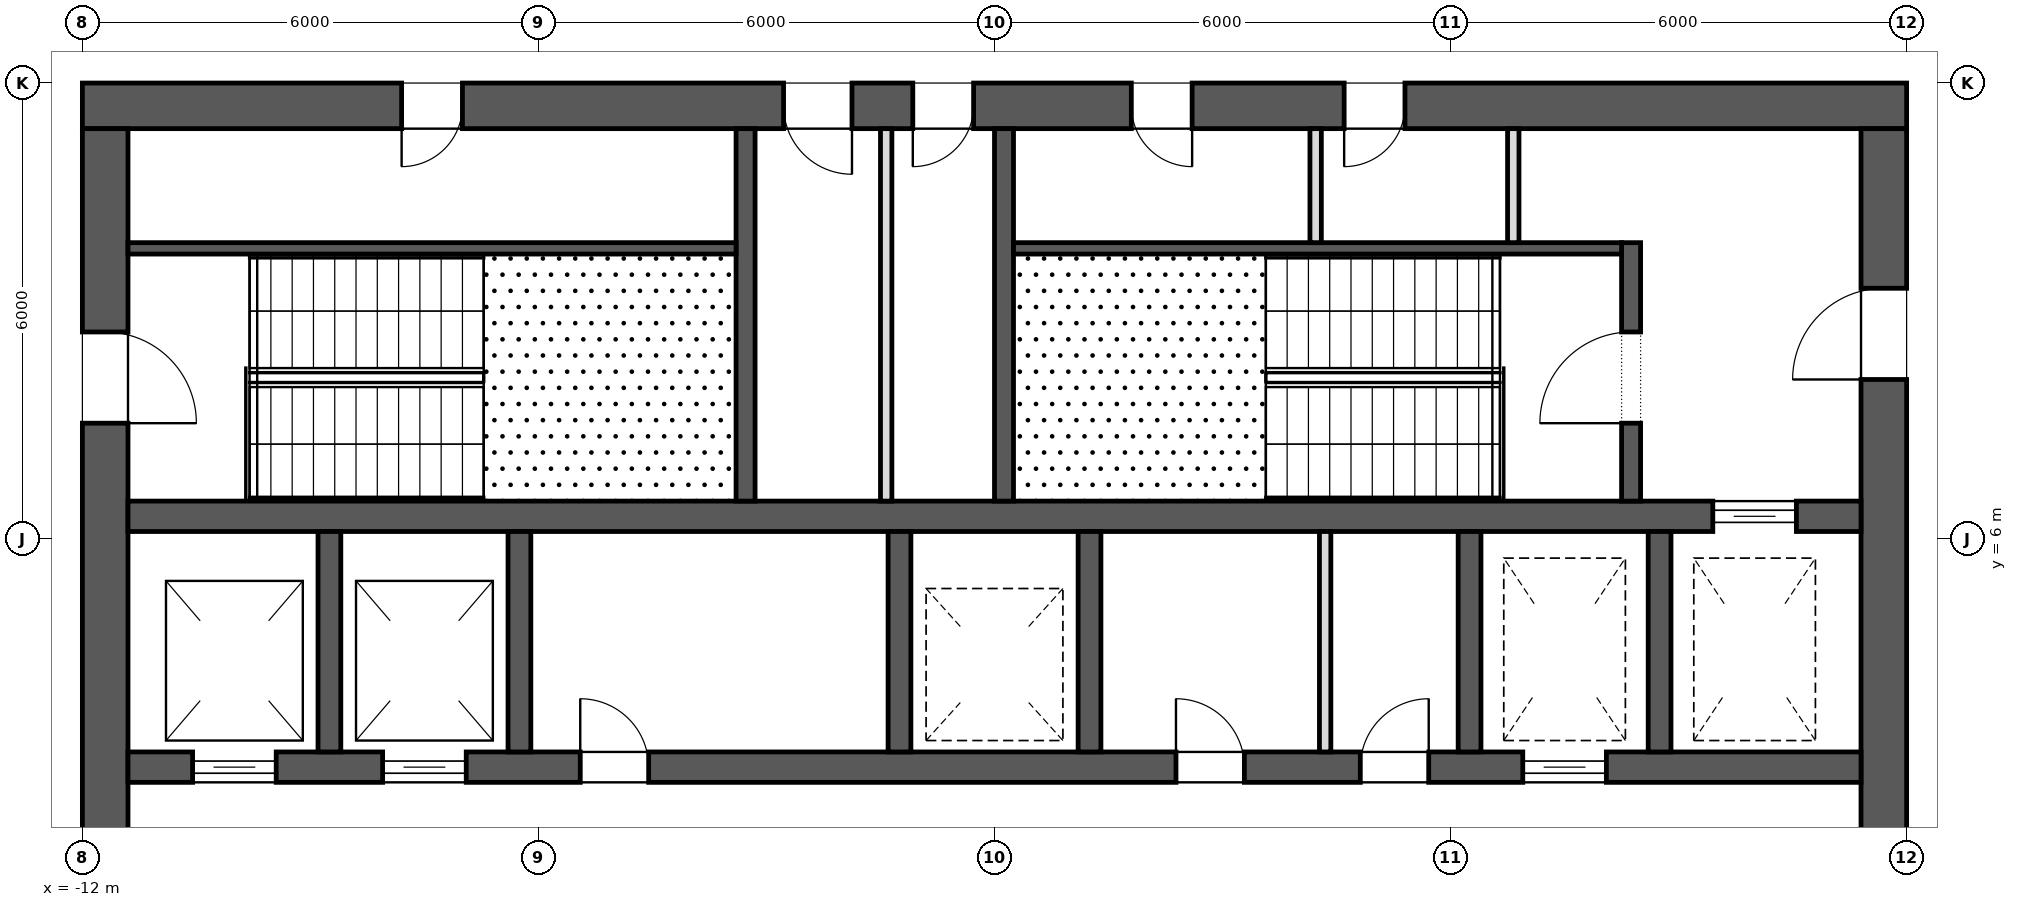
"""IFC4 building model, lengths in metres.
Left out: names, types, materials, properties, quantities, classifications, styles, units other than length and angle.
Written with IfcOpenShell. Run it as: python <this file> out.ifc"""

import sys

from ifc_helpers import new_model, si_unit, direction, frame, frame_2d, origin, place, context, subcontext, project, spatial, rectangle, extrude, element, fill, save


model = new_model("IFC4")
c1 = context("Model", 3, precision=1e-05, world=origin(), true_north=direction((0.0, 1.0)))
c2 = subcontext(c1, "Body", "Model", "MODEL_VIEW")
j1 = project(units=[si_unit("LENGTHUNIT", "METRE"), si_unit("PLANEANGLEUNIT", "RADIAN")], contexts=[c1])
p1 = place(None, origin())
s1 = spatial("IfcSite", under=j1, at=p1, CompositionType="ELEMENT")
p2 = place(p1, origin())
s2 = spatial("IfcBuilding", under=s1, at=p2, CompositionType="ELEMENT")
p3 = place(p2, frame((0.0, 0.0, 280.3)))
s3 = spatial("IfcBuildingStorey", under=s2, at=p3, CompositionType="ELEMENT", Elevation=280.3)
p4 = place(p3, frame((-12.0, 11.7, 0.0), z_axis=(0.0, 0.0, 1.0), x_axis=(1.0, 0.0, 0.0)))
e1 = element("IfcWall", 1, at=p4, inside=s3, PredefinedType="SHEAR", context=c2, shape_type="SweptSolid", body=[
    extrude(rectangle(XDim=24.0, YDim=0.6, at=frame_2d((12.0, 0.0))), origin(), (0.0, 0.0, 1.0), 4.0),
])
p5 = place(p4, frame((9.225, 0.0, 0.0)))
e2 = element("IfcOpeningElement", 2, at=p5, cuts=e1, PredefinedType="OPENING", context=c2, shape_type="SweptSolid", body=[
    extrude(rectangle(XDim=0.9, YDim=2.1, at=frame_2d((0.45, 1.05))), frame((0.0, 0.312, 0.0), z_axis=(0.0, -1.0, 0.0), x_axis=(1.0, 0.0, 0.0)), (0.0, 0.0, 1.0), 0.624),
])
p6 = place(p4, frame((10.925, 0.0, 0.0)))
e3 = element("IfcOpeningElement", 3, at=p6, cuts=e1, PredefinedType="OPENING", context=c2, shape_type="SweptSolid", body=[
    extrude(rectangle(XDim=0.8, YDim=2.1, at=frame_2d((0.4, 1.05))), frame((0.0, 0.312, 0.0), z_axis=(0.0, -1.0, 0.0), x_axis=(1.0, 0.0, 0.0)), (0.0, 0.0, 1.0), 0.624),
])
p7 = place(p4, frame((4.2, 0.0, 0.0)))
e4 = element("IfcOpeningElement", 4, at=p7, cuts=e1, PredefinedType="OPENING", context=c2, shape_type="SweptSolid", body=[
    extrude(rectangle(XDim=0.8, YDim=2.1, at=frame_2d((0.4, 1.05))), frame((0.0, 0.312, 0.0), z_axis=(0.0, -1.0, 0.0), x_axis=(1.0, 0.0, 0.0)), (0.0, 0.0, 1.0), 0.624),
])
p8 = place(p4, frame((13.8, 0.0, 0.0)))
e5 = element("IfcOpeningElement", 5, at=p8, cuts=e1, PredefinedType="OPENING", context=c2, shape_type="SweptSolid", body=[
    extrude(rectangle(XDim=0.8, YDim=2.1, at=frame_2d((0.4, 1.05))), frame((0.0, 0.312, 0.0), z_axis=(0.0, -1.0, 0.0), x_axis=(1.0, 0.0, 0.0)), (0.0, 0.0, 1.0), 0.624),
])
p9 = place(p4, frame((16.6, 0.0, 0.0)))
e6 = element("IfcOpeningElement", 6, at=p9, cuts=e1, PredefinedType="OPENING", context=c2, shape_type="SweptSolid", body=[
    extrude(rectangle(XDim=0.8, YDim=2.1, at=frame_2d((0.4, 1.05))), frame((0.0, 0.312, 0.0), z_axis=(0.0, -1.0, 0.0), x_axis=(1.0, 0.0, 0.0)), (0.0, 0.0, 1.0), 0.624),
])
p10 = place(p3, frame((11.7, -11.4, 0.0), z_axis=(0.0, 0.0, 1.0), x_axis=(0.0, 1.0, 0.0)))
e7 = element("IfcWall", 7, at=p10, inside=s3, PredefinedType="SHEAR", context=c2, shape_type="SweptSolid", body=[
    extrude(rectangle(XDim=22.8, YDim=0.6, at=frame_2d((11.4, 0.0))), origin(), (0.0, 0.0, 1.0), 4.0),
])
p11 = place(p10, frame((10.2, 0.0, 0.0)))
e8 = element("IfcOpeningElement", 8, at=p11, cuts=e7, PredefinedType="OPENING", context=c2, shape_type="SweptSolid", body=[
    extrude(rectangle(XDim=2.4, YDim=2.1, at=frame_2d((1.2, 1.05))), frame((0.0, 0.312, 0.0), z_axis=(0.0, -1.0, 0.0), x_axis=(1.0, 0.0, 0.0)), (0.0, 0.0, 1.0), 0.624),
])
p12 = place(p10, frame((19.5, 0.0, 0.0)))
e9 = element("IfcOpeningElement", 9, at=p12, cuts=e7, PredefinedType="OPENING", context=c2, shape_type="SweptSolid", body=[
    extrude(rectangle(XDim=1.2, YDim=2.1, at=frame_2d((0.6, 1.05))), frame((0.0, 0.312, 0.0), z_axis=(0.0, -1.0, 0.0), x_axis=(1.0, 0.0, 0.0)), (0.0, 0.0, 1.0), 0.624),
])
p13 = place(p10, frame((2.1, 0.0, 0.0)))
e10 = element("IfcOpeningElement", 10, at=p13, cuts=e7, PredefinedType="OPENING", context=c2, shape_type="SweptSolid", body=[
    extrude(rectangle(XDim=1.2, YDim=2.1, at=frame_2d((0.6, 1.05))), frame((0.0, 0.312, 0.0), z_axis=(0.0, -1.0, 0.0), x_axis=(1.0, 0.0, 0.0)), (0.0, 0.0, 1.0), 0.624),
])
p14 = place(p3, frame((-11.7, -11.4, 0.0), z_axis=(0.0, 0.0, 1.0), x_axis=(0.0, 1.0, 0.0)))
e11 = element("IfcWall", 11, at=p14, inside=s3, PredefinedType="SHEAR", context=c2, shape_type="SweptSolid", body=[
    extrude(rectangle(XDim=22.8, YDim=0.6, at=frame_2d((11.4, 0.0))), origin(), (0.0, 0.0, 1.0), 4.0),
])
p15 = place(p14, frame((10.2, 0.0, 0.0)))
e12 = element("IfcOpeningElement", 12, at=p15, cuts=e11, PredefinedType="OPENING", context=c2, shape_type="SweptSolid", body=[
    extrude(rectangle(XDim=2.4, YDim=2.1, at=frame_2d((1.2, 1.05))), frame((0.0, 0.312, 0.0), z_axis=(0.0, -1.0, 0.0), x_axis=(1.0, 0.0, 0.0)), (0.0, 0.0, 1.0), 0.624),
])
p16 = place(p14, frame((18.925, 0.0, 0.0)))
e13 = element("IfcOpeningElement", 13, at=p16, cuts=e11, PredefinedType="OPENING", context=c2, shape_type="SweptSolid", body=[
    extrude(rectangle(XDim=1.2, YDim=2.1, at=frame_2d((0.6, 1.05))), frame((0.0, 0.312, 0.0), z_axis=(0.0, -1.0, 0.0), x_axis=(1.0, 0.0, 0.0)), (0.0, 0.0, 1.0), 0.624),
])
p17 = place(p14, frame((2.675, 0.0, 0.0)))
e14 = element("IfcOpeningElement", 14, at=p17, cuts=e11, PredefinedType="OPENING", context=c2, shape_type="SweptSolid", body=[
    extrude(rectangle(XDim=1.2, YDim=2.1, at=frame_2d((0.6, 1.05))), frame((0.0, 0.312, 0.0), z_axis=(0.0, -1.0, 0.0), x_axis=(1.0, 0.0, 0.0)), (0.0, 0.0, 1.0), 0.624),
])
p18 = place(p3, frame((-11.4, 3.0, 0.0), z_axis=(0.0, 0.0, 1.0), x_axis=(1.0, 0.0, 0.0)))
e15 = element("IfcWall", 15, at=p18, inside=s3, PredefinedType="SHEAR", context=c2, shape_type="SweptSolid", body=[
    extrude(rectangle(XDim=22.8, YDim=0.4, at=frame_2d((11.4, 0.0))), origin(), (0.0, 0.0, 1.0), 4.0),
])
p19 = place(p18, frame((0.85, 0.0, 0.0)))
e16 = element("IfcOpeningElement", 16, at=p19, cuts=e15, PredefinedType="OPENING", context=c2, shape_type="SweptSolid", body=[
    extrude(rectangle(XDim=1.1, YDim=2.1, at=frame_2d((0.55, 1.05))), frame((0.0, 0.212, 0.0), z_axis=(0.0, -1.0, 0.0), x_axis=(1.0, 0.0, 0.0)), (0.0, 0.0, 1.0), 0.424),
])
p20 = place(p18, frame((3.35, 0.0, 0.0)))
e17 = element("IfcOpeningElement", 17, at=p20, cuts=e15, PredefinedType="OPENING", context=c2, shape_type="SweptSolid", body=[
    extrude(rectangle(XDim=1.1, YDim=2.1, at=frame_2d((0.55, 1.05))), frame((0.0, 0.212, 0.0), z_axis=(0.0, -1.0, 0.0), x_axis=(1.0, 0.0, 0.0)), (0.0, 0.0, 1.0), 0.424),
])
p21 = place(p18, frame((18.35, 0.0, 0.0)))
e18 = element("IfcOpeningElement", 18, at=p21, cuts=e15, PredefinedType="OPENING", context=c2, shape_type="SweptSolid", body=[
    extrude(rectangle(XDim=1.1, YDim=2.1, at=frame_2d((0.55, 1.05))), frame((0.0, 0.212, 0.0), z_axis=(0.0, -1.0, 0.0), x_axis=(1.0, 0.0, 0.0)), (0.0, 0.0, 1.0), 0.424),
])
p22 = place(p18, frame((13.788, 0.0, 0.0)))
e19 = element("IfcOpeningElement", 19, at=p22, cuts=e15, PredefinedType="OPENING", context=c2, shape_type="SweptSolid", body=[
    extrude(rectangle(XDim=0.9, YDim=2.1, at=frame_2d((0.45, 1.05))), frame((0.0, 0.212, 0.0), z_axis=(0.0, -1.0, 0.0), x_axis=(1.0, 0.0, 0.0)), (0.0, 0.0, 1.0), 0.424),
])
p23 = place(p18, frame((16.212, 0.0, 0.0)))
e20 = element("IfcOpeningElement", 20, at=p23, cuts=e15, PredefinedType="OPENING", context=c2, shape_type="SweptSolid", body=[
    extrude(rectangle(XDim=0.9, YDim=2.1, at=frame_2d((0.45, 1.05))), frame((0.0, 0.212, 0.0), z_axis=(0.0, -1.0, 0.0), x_axis=(1.0, 0.0, 0.0)), (0.0, 0.0, 1.0), 0.424),
])
p24 = place(p18, frame((5.95, 0.0, 0.0)))
e21 = element("IfcOpeningElement", 21, at=p24, cuts=e15, PredefinedType="OPENING", context=c2, shape_type="SweptSolid", body=[
    extrude(rectangle(XDim=0.9, YDim=2.1, at=frame_2d((0.45, 1.05))), frame((0.0, 0.212, 0.0), z_axis=(0.0, -1.0, 0.0), x_axis=(1.0, 0.0, 0.0)), (0.0, 0.0, 1.0), 0.424),
])
p25 = place(p3, frame((-11.4, 6.3, 0.0), z_axis=(0.0, 0.0, 1.0), x_axis=(1.0, 0.0, 0.0)))
e22 = element("IfcWall", 22, at=p25, inside=s3, PredefinedType="SHEAR", context=c2, shape_type="SweptSolid", body=[
    extrude(rectangle(XDim=22.8, YDim=0.4, at=frame_2d((11.4, 0.0))), origin(), (0.0, 0.0, 1.0), 4.0),
])
p26 = place(p25, frame((20.85, 0.0, 0.0)))
e23 = element("IfcOpeningElement", 23, at=p26, cuts=e22, PredefinedType="OPENING", context=c2, shape_type="SweptSolid", body=[
    extrude(rectangle(XDim=1.1, YDim=2.1, at=frame_2d((0.55, 1.05))), frame((0.0, 0.212, 0.0), z_axis=(0.0, -1.0, 0.0), x_axis=(1.0, 0.0, 0.0)), (0.0, 0.0, 1.0), 0.424),
])
for number, where, z_axis, x_axis in (
    (24, (-8.75, 3.2, 0.0), (0.0, 0.0, 1.0), (0.0, 1.0, 0.0)),
    (25, (-6.25, 3.2, 0.0), (0.0, 0.0, 1.0), (0.0, 1.0, 0.0)),
    (26, (-1.25, 3.2, 0.0), (0.0, 0.0, 1.0), (0.0, 1.0, 0.0)),
    (27, (1.25, 3.2, 0.0), (0.0, 0.0, 1.0), (0.0, 1.0, 0.0)),
    (28, (6.25, 3.2, 0.0), (0.0, 0.0, 1.0), (0.0, 1.0, 0.0)),
    (29, (8.75, 3.2, 0.0), (0.0, 0.0, 1.0), (0.0, 1.0, 0.0)),
):
    element("IfcWall", number, at=place(p3, frame(where, z_axis=z_axis, x_axis=x_axis)), inside=s3, PredefinedType="SHEAR", context=c2, shape_type="SweptSolid", body=[
        extrude(rectangle(XDim=2.9, YDim=0.3, at=frame_2d((1.45, 0.0))), origin(), (0.0, 0.0, 1.0), 4.0),
    ])
for number, where, z_axis, x_axis in (
    (30, (-3.275, 6.5, 0.0), (0.0, 0.0, 1.0), (0.0, 1.0, 0.0)),
    (31, (0.125, 6.5, 0.0), (0.0, 0.0, 1.0), (0.0, 1.0, 0.0)),
):
    element("IfcWall", number, at=place(p3, frame(where, z_axis=z_axis, x_axis=x_axis)), inside=s3, PredefinedType="SHEAR", context=c2, shape_type="SweptSolid", body=[
        extrude(rectangle(XDim=4.9, YDim=0.25, at=frame_2d((2.45, 0.0))), origin(), (0.0, 0.0, 1.0), 3.7),
    ])
p27 = place(p3, frame((8.375, 6.5, 0.0), z_axis=(0.0, 0.0, 1.0), x_axis=(0.0, 1.0, 0.0)))
e32 = element("IfcWall", 32, at=p27, inside=s3, PredefinedType="SHEAR", context=c2, shape_type="SweptSolid", body=[
    extrude(rectangle(XDim=3.4, YDim=0.25, at=frame_2d((1.7, 0.0))), origin(), (0.0, 0.0, 1.0), 3.7),
])
p28 = place(p27, frame((1.025, 0.0, 0.0)))
e33 = element("IfcOpeningElement", 33, at=p28, cuts=e32, PredefinedType="OPENING", context=c2, shape_type="SweptSolid", body=[
    extrude(rectangle(XDim=1.2, YDim=2.1, at=frame_2d((0.6, 1.05))), frame((0.0, 0.137, 0.0), z_axis=(0.0, -1.0, 0.0), x_axis=(1.0, 0.0, 0.0)), (0.0, 0.0, 1.0), 0.274),
])
for number, where, z_axis, x_axis in (
    (34, (-11.4, 9.825, 0.0), (0.0, 0.0, 1.0), (1.0, 0.0, 0.0)),
    (35, (0.25, 9.825, 0.0), (0.0, 0.0, 1.0), (1.0, 0.0, 0.0)),
):
    element("IfcWall", number, at=place(p3, frame(where, z_axis=z_axis, x_axis=x_axis)), inside=s3, PredefinedType="SHEAR", context=c2, shape_type="SweptSolid", body=[
        extrude(rectangle(XDim=8.0, YDim=0.15, at=frame_2d((4.0, 0.0))), origin(), (0.0, 0.0, 1.0), 3.7),
    ])
p29 = place(p3, frame((-1.425, 6.5, 0.0), z_axis=(0.0, 0.0, 1.0), x_axis=(0.0, 1.0, 0.0)))
e36 = element("IfcWall", 36, at=p29, inside=s3, PredefinedType="PARTITIONING", context=c2, shape_type="SweptSolid", body=[
    extrude(rectangle(XDim=4.9, YDim=0.15, at=frame_2d((2.45, 0.0))), origin(), (0.0, 0.0, 1.0), 3.7),
])
for number, where, z_axis, x_axis in (
    (37, (4.225, 9.9, 0.0), (0.0, 0.0, 1.0), (0.0, 1.0, 0.0)),
    (38, (6.825, 9.9, 0.0), (0.0, 0.0, 1.0), (0.0, 1.0, 0.0)),
):
    element("IfcWall", number, at=place(p3, frame(where, z_axis=z_axis, x_axis=x_axis)), inside=s3, PredefinedType="PARTITIONING", context=c2, shape_type="SweptSolid", body=[
        extrude(rectangle(XDim=1.5, YDim=0.15, at=frame_2d((0.75, 0.0))), origin(), (0.0, 0.0, 1.0), 3.7),
    ])
p30 = place(p3, frame((4.35, 3.2, 0.0), z_axis=(0.0, 0.0, 1.0), x_axis=(0.0, 1.0, 0.0)))
e39 = element("IfcWall", 39, at=p30, inside=s3, PredefinedType="PARTITIONING", context=c2, shape_type="SweptSolid", body=[
    extrude(rectangle(XDim=2.9, YDim=0.15, at=frame_2d((1.45, 0.0))), origin(), (0.0, 0.0, 1.0), 3.7),
])
p31 = place(p26, origin())
e40 = element("IfcDoor", 40, at=p31, inside=s3, OperationType="SLIDING_TO_LEFT", PredefinedType="DOOR", context=c2, shape_type="SweptSolid", body=[
    extrude(rectangle(XDim=1.1, YDim=2.1, at=frame_2d((0.55, 1.05))), frame((0.0, 0.025, 0.0), z_axis=(0.0, -1.0, 0.0), x_axis=(1.0, 0.0, 0.0)), (0.0, 0.0, 1.0), 0.05),
])
fill(e23, e40)
p32 = place(p19, origin())
e41 = element("IfcDoor", 41, at=p32, inside=s3, OperationType="SLIDING_TO_LEFT", PredefinedType="DOOR", context=c2, shape_type="SweptSolid", body=[
    extrude(rectangle(XDim=1.1, YDim=2.1, at=frame_2d((0.55, 1.05))), frame((0.0, 0.025, 0.0), z_axis=(0.0, -1.0, 0.0), x_axis=(1.0, 0.0, 0.0)), (0.0, 0.0, 1.0), 0.05),
])
fill(e16, e41)
p33 = place(p20, origin())
e42 = element("IfcDoor", 42, at=p33, inside=s3, OperationType="SLIDING_TO_LEFT", PredefinedType="DOOR", context=c2, shape_type="SweptSolid", body=[
    extrude(rectangle(XDim=1.1, YDim=2.1, at=frame_2d((0.55, 1.05))), frame((0.0, 0.025, 0.0), z_axis=(0.0, -1.0, 0.0), x_axis=(1.0, 0.0, 0.0)), (0.0, 0.0, 1.0), 0.05),
])
fill(e17, e42)
p34 = place(p21, origin())
e43 = element("IfcDoor", 43, at=p34, inside=s3, OperationType="SLIDING_TO_LEFT", PredefinedType="DOOR", context=c2, shape_type="SweptSolid", body=[
    extrude(rectangle(XDim=1.1, YDim=2.1, at=frame_2d((0.55, 1.05))), frame((0.0, 0.025, 0.0), z_axis=(0.0, -1.0, 0.0), x_axis=(1.0, 0.0, 0.0)), (0.0, 0.0, 1.0), 0.05),
])
fill(e18, e43)
p35 = place(p16, frame((1.2, 0.0, 0.0), z_axis=(0.0, 0.0, 1.0), x_axis=(-1.0, 0.0, 0.0)))
e44 = element("IfcDoor", 44, at=p35, inside=s3, OperationType="SINGLE_SWING_LEFT", PredefinedType="DOOR", context=c2, shape_type="SweptSolid", body=[
    extrude(rectangle(XDim=1.2, YDim=2.1, at=frame_2d((0.6, 1.05))), frame((0.0, 0.025, 0.0), z_axis=(0.0, -1.0, 0.0), x_axis=(1.0, 0.0, 0.0)), (0.0, 0.0, 1.0), 0.05),
])
fill(e13, e44)
p36 = place(p28, origin())
e45 = element("IfcDoor", 45, at=p36, inside=s3, OperationType="SINGLE_SWING_RIGHT", PredefinedType="DOOR", context=c2, shape_type="SweptSolid", body=[
    extrude(rectangle(XDim=1.2, YDim=2.1, at=frame_2d((0.6, 1.05))), frame((0.0, 0.025, 0.0), z_axis=(0.0, -1.0, 0.0), x_axis=(1.0, 0.0, 0.0)), (0.0, 0.0, 1.0), 0.05),
])
fill(e33, e45)
p37 = place(p12, origin())
e46 = element("IfcDoor", 46, at=p37, inside=s3, OperationType="SINGLE_SWING_RIGHT", PredefinedType="DOOR", context=c2, shape_type="SweptSolid", body=[
    extrude(rectangle(XDim=1.2, YDim=2.1, at=frame_2d((0.6, 1.05))), frame((0.0, 0.025, 0.0), z_axis=(0.0, -1.0, 0.0), x_axis=(1.0, 0.0, 0.0)), (0.0, 0.0, 1.0), 0.05),
])
fill(e9, e46)
p38 = place(p5, frame((0.9, 0.0, 0.0), z_axis=(0.0, 0.0, 1.0), x_axis=(-1.0, 0.0, 0.0)))
e47 = element("IfcDoor", 47, at=p38, inside=s3, OperationType="SINGLE_SWING_RIGHT", PredefinedType="DOOR", context=c2, shape_type="SweptSolid", body=[
    extrude(rectangle(XDim=0.9, YDim=2.1, at=frame_2d((0.45, 1.05))), frame((0.0, 0.025, 0.0), z_axis=(0.0, -1.0, 0.0), x_axis=(1.0, 0.0, 0.0)), (0.0, 0.0, 1.0), 0.05),
])
fill(e2, e47)
p39 = place(p6, frame((0.8, 0.0, 0.0), z_axis=(0.0, 0.0, 1.0), x_axis=(-1.0, 0.0, 0.0)))
e48 = element("IfcDoor", 48, at=p39, inside=s3, OperationType="SINGLE_SWING_LEFT", PredefinedType="DOOR", context=c2, shape_type="SweptSolid", body=[
    extrude(rectangle(XDim=0.8, YDim=2.1, at=frame_2d((0.4, 1.05))), frame((0.0, 0.025, 0.0), z_axis=(0.0, -1.0, 0.0), x_axis=(1.0, 0.0, 0.0)), (0.0, 0.0, 1.0), 0.05),
])
fill(e3, e48)
p40 = place(p7, frame((0.8, 0.0, 0.0), z_axis=(0.0, 0.0, 1.0), x_axis=(-1.0, 0.0, 0.0)))
e49 = element("IfcDoor", 49, at=p40, inside=s3, OperationType="SINGLE_SWING_LEFT", PredefinedType="DOOR", context=c2, shape_type="SweptSolid", body=[
    extrude(rectangle(XDim=0.8, YDim=2.1, at=frame_2d((0.4, 1.05))), frame((0.0, 0.025, 0.0), z_axis=(0.0, -1.0, 0.0), x_axis=(1.0, 0.0, 0.0)), (0.0, 0.0, 1.0), 0.05),
])
fill(e4, e49)
p41 = place(p8, frame((0.8, 0.0, 0.0), z_axis=(0.0, 0.0, 1.0), x_axis=(-1.0, 0.0, 0.0)))
e50 = element("IfcDoor", 50, at=p41, inside=s3, OperationType="SINGLE_SWING_RIGHT", PredefinedType="DOOR", context=c2, shape_type="SweptSolid", body=[
    extrude(rectangle(XDim=0.8, YDim=2.1, at=frame_2d((0.4, 1.05))), frame((0.0, 0.025, 0.0), z_axis=(0.0, -1.0, 0.0), x_axis=(1.0, 0.0, 0.0)), (0.0, 0.0, 1.0), 0.05),
])
fill(e5, e50)
p42 = place(p9, frame((0.8, 0.0, 0.0), z_axis=(0.0, 0.0, 1.0), x_axis=(-1.0, 0.0, 0.0)))
e51 = element("IfcDoor", 51, at=p42, inside=s3, OperationType="SINGLE_SWING_LEFT", PredefinedType="DOOR", context=c2, shape_type="SweptSolid", body=[
    extrude(rectangle(XDim=0.8, YDim=2.1, at=frame_2d((0.4, 1.05))), frame((0.0, 0.025, 0.0), z_axis=(0.0, -1.0, 0.0), x_axis=(1.0, 0.0, 0.0)), (0.0, 0.0, 1.0), 0.05),
])
fill(e6, e51)
p43 = place(p22, origin())
e52 = element("IfcDoor", 52, at=p43, inside=s3, OperationType="SINGLE_SWING_RIGHT", PredefinedType="DOOR", context=c2, shape_type="SweptSolid", body=[
    extrude(rectangle(XDim=0.9, YDim=2.1, at=frame_2d((0.45, 1.05))), frame((0.0, 0.025, 0.0), z_axis=(0.0, -1.0, 0.0), x_axis=(1.0, 0.0, 0.0)), (0.0, 0.0, 1.0), 0.05),
])
fill(e19, e52)
p44 = place(p23, origin())
e53 = element("IfcDoor", 53, at=p44, inside=s3, OperationType="SINGLE_SWING_LEFT", PredefinedType="DOOR", context=c2, shape_type="SweptSolid", body=[
    extrude(rectangle(XDim=0.9, YDim=2.1, at=frame_2d((0.45, 1.05))), frame((0.0, 0.025, 0.0), z_axis=(0.0, -1.0, 0.0), x_axis=(1.0, 0.0, 0.0)), (0.0, 0.0, 1.0), 0.05),
])
fill(e20, e53)
p45 = place(p24, origin())
e54 = element("IfcDoor", 54, at=p45, inside=s3, OperationType="SINGLE_SWING_RIGHT", PredefinedType="DOOR", context=c2, shape_type="SweptSolid", body=[
    extrude(rectangle(XDim=0.9, YDim=2.1, at=frame_2d((0.45, 1.05))), frame((0.0, 0.025, 0.0), z_axis=(0.0, -1.0, 0.0), x_axis=(1.0, 0.0, 0.0)), (0.0, 0.0, 1.0), 0.05),
])
fill(e21, e54)
save(model, sys.argv[1])
